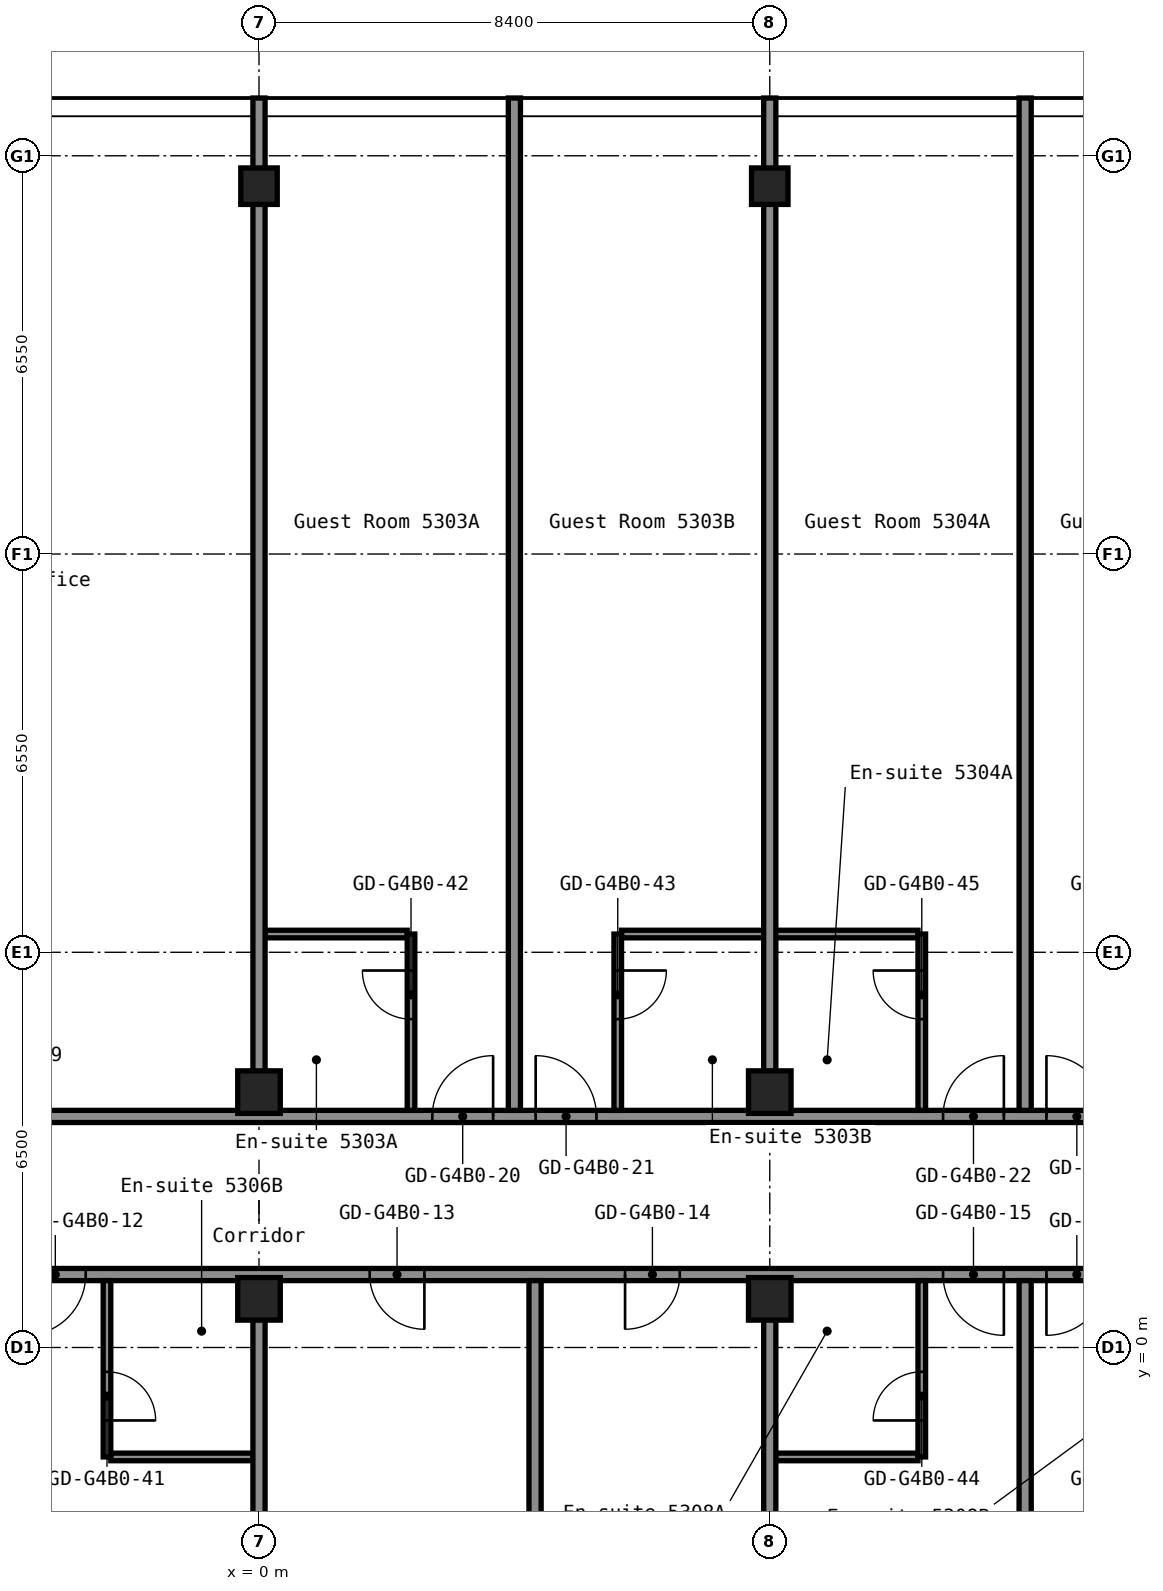
"""IFC4 building model, lengths in metres.
Left out: names, types, materials, properties, quantities, classifications, styles, units other than length and angle.
Written with IfcOpenShell. Run it as: python <this file> out.ifc"""

import sys

from ifc_helpers import new_model, si_unit, direction, frame, frame_2d, origin, origin_2d, place, context, subcontext, project, spatial, rectangle, hollow_rectangle, extrude, element, fill, save


model = new_model("IFC4")
c1 = context("Model", 3, precision=1e-05, world=origin(), true_north=direction((0.0, 1.0)))
c2 = subcontext(c1, "Body", "Model", "MODEL_VIEW")
j1 = project(units=[si_unit("LENGTHUNIT", "METRE"), si_unit("PLANEANGLEUNIT", "RADIAN")], contexts=[c1])
p1 = place(None, origin())
s1 = spatial("IfcSite", under=j1, at=p1, CompositionType="ELEMENT")
p2 = place(p1, origin())
s2 = spatial("IfcBuilding", under=s1, at=p2, CompositionType="ELEMENT")
p3 = place(p2, frame((0.0, 0.0, 189.8)))
s3 = spatial("IfcBuildingStorey", under=s2, at=p3, CompositionType="ELEMENT", Elevation=189.8)
for number, where, z_axis, x_axis in (
    (1, (0.0, 0.8, 0.0), (0.0, 0.0, 1.0), (1.0, 0.0, 0.0)),
    (2, (0.0, 4.2, 0.0), (0.0, 0.0, 1.0), (1.0, 0.0, 0.0)),
):
    element("IfcColumn", number, at=place(p3, frame(where, z_axis=z_axis, x_axis=x_axis)), inside=s3, PredefinedType="COLUMN", context=c2, shape_type="SweptSolid", body=[
        extrude(hollow_rectangle(XDim=0.7, YDim=0.7, WallThickness=0.028, at=origin_2d()), origin(), (0.0, 0.0, 1.0), 2.75),
    ])
p4 = place(p3, frame((0.0, 19.1, 0.0), z_axis=(0.0, 0.0, 1.0), x_axis=(1.0, 0.0, 0.0)))
e3 = element("IfcColumn", 3, at=p4, inside=s3, PredefinedType="COLUMN", context=c2, shape_type="SweptSolid", body=[
    extrude(hollow_rectangle(XDim=0.6, YDim=0.6, WallThickness=0.025, InnerFilletRadius=0.038, OuterFilletRadius=0.062, at=origin_2d()), origin(), (0.0, 0.0, 1.0), 2.75),
])
for number, where, z_axis, x_axis in (
    (4, (8.4, 0.8, 0.0), (0.0, 0.0, 1.0), (1.0, 0.0, 0.0)),
    (5, (8.4, 4.2, 0.0), (0.0, 0.0, 1.0), (1.0, 0.0, 0.0)),
):
    element("IfcColumn", number, at=place(p3, frame(where, z_axis=z_axis, x_axis=x_axis)), inside=s3, PredefinedType="COLUMN", context=c2, shape_type="SweptSolid", body=[
        extrude(hollow_rectangle(XDim=0.7, YDim=0.7, WallThickness=0.028, at=origin_2d()), origin(), (0.0, 0.0, 1.0), 2.75),
    ])
p5 = place(p3, frame((8.4, 19.1, 0.0), z_axis=(0.0, 0.0, 1.0), x_axis=(1.0, 0.0, 0.0)))
e6 = element("IfcColumn", 6, at=p5, inside=s3, PredefinedType="COLUMN", context=c2, shape_type="SweptSolid", body=[
    extrude(hollow_rectangle(XDim=0.6, YDim=0.6, WallThickness=0.025, InnerFilletRadius=0.038, OuterFilletRadius=0.062, at=origin_2d()), origin(), (0.0, 0.0, 1.0), 2.75),
])
for number, where, z_axis, x_axis in (
    (7, (-2.438, -1.8, 0.0), (0.0, 0.0, 1.0), (1.0, 0.0, 0.0)),
    (8, (8.5, -1.8, 0.0), (0.0, 0.0, 1.0), (1.0, 0.0, 0.0)),
):
    element("IfcWall", number, at=place(p3, frame(where, z_axis=z_axis, x_axis=x_axis)), inside=s3, PredefinedType="PARTITIONING", context=c2, shape_type="SweptSolid", body=[
        extrude(rectangle(XDim=2.337, YDim=0.125, at=frame_2d((1.169, 0.0))), origin(), (0.0, 0.0, 1.0), 2.75),
    ])
p6 = place(p3, frame((-16.8, 1.2, 0.0), z_axis=(0.0, 0.0, 1.0), x_axis=(1.0, 0.0, 0.0)))
e9 = element("IfcWall", 9, at=p6, inside=s3, PredefinedType="PARTITIONING", context=c2, shape_type="SweptSolid", body=[
    extrude(rectangle(XDim=33.6, YDim=0.2, at=frame_2d((16.8, 0.0))), origin(), (0.0, 0.0, 1.0), 2.75),
])
p7 = place(p6, frame((2.85, 0.0, 0.0)))
e10 = element("IfcOpeningElement", 10, at=p7, cuts=e9, PredefinedType="OPENING", context=c2, shape_type="SweptSolid", body=[
    extrude(rectangle(XDim=1.0, YDim=2.1, at=frame_2d((0.5, 1.05))), frame((0.0, 0.11, 0.0), z_axis=(0.0, -1.0, 0.0), x_axis=(1.0, 0.0, 0.0)), (0.0, 0.0, 1.0), 0.22),
])
p8 = place(p6, frame((4.55, 0.0, 0.0)))
e11 = element("IfcOpeningElement", 11, at=p8, cuts=e9, PredefinedType="OPENING", context=c2, shape_type="SweptSolid", body=[
    extrude(rectangle(XDim=1.0, YDim=2.1, at=frame_2d((0.5, 1.05))), frame((0.0, 0.11, 0.0), z_axis=(0.0, -1.0, 0.0), x_axis=(1.0, 0.0, 0.0)), (0.0, 0.0, 1.0), 0.22),
])
p9 = place(p6, frame((11.25, 0.0, 0.0)))
e12 = element("IfcOpeningElement", 12, at=p9, cuts=e9, PredefinedType="OPENING", context=c2, shape_type="SweptSolid", body=[
    extrude(rectangle(XDim=1.0, YDim=2.1, at=frame_2d((0.5, 1.05))), frame((0.0, 0.11, 0.0), z_axis=(0.0, -1.0, 0.0), x_axis=(1.0, 0.0, 0.0)), (0.0, 0.0, 1.0), 0.22),
])
p10 = place(p6, frame((12.95, 0.0, 0.0)))
e13 = element("IfcOpeningElement", 13, at=p10, cuts=e9, PredefinedType="OPENING", context=c2, shape_type="SweptSolid", body=[
    extrude(rectangle(XDim=1.0, YDim=2.1, at=frame_2d((0.5, 1.05))), frame((0.0, 0.11, 0.0), z_axis=(0.0, -1.0, 0.0), x_axis=(1.0, 0.0, 0.0)), (0.0, 0.0, 1.0), 0.22),
])
p11 = place(p6, frame((18.62, 0.0, 0.0)))
e14 = element("IfcOpeningElement", 14, at=p11, cuts=e9, PredefinedType="OPENING", context=c2, shape_type="SweptSolid", body=[
    extrude(rectangle(XDim=0.9, YDim=2.1, at=frame_2d((0.45, 1.05))), frame((0.0, 0.11, 0.0), z_axis=(0.0, -1.0, 0.0), x_axis=(1.0, 0.0, 0.0)), (0.0, 0.0, 1.0), 0.22),
])
p12 = place(p6, frame((22.82, 0.0, 0.0)))
e15 = element("IfcOpeningElement", 15, at=p12, cuts=e9, PredefinedType="OPENING", context=c2, shape_type="SweptSolid", body=[
    extrude(rectangle(XDim=0.9, YDim=2.1, at=frame_2d((0.45, 1.05))), frame((0.0, 0.11, 0.0), z_axis=(0.0, -1.0, 0.0), x_axis=(1.0, 0.0, 0.0)), (0.0, 0.0, 1.0), 0.22),
])
p13 = place(p6, frame((28.05, 0.0, 0.0)))
e16 = element("IfcOpeningElement", 16, at=p13, cuts=e9, PredefinedType="OPENING", context=c2, shape_type="SweptSolid", body=[
    extrude(rectangle(XDim=1.0, YDim=2.1, at=frame_2d((0.5, 1.05))), frame((0.0, 0.11, 0.0), z_axis=(0.0, -1.0, 0.0), x_axis=(1.0, 0.0, 0.0)), (0.0, 0.0, 1.0), 0.22),
])
p14 = place(p6, frame((29.75, 0.0, 0.0)))
e17 = element("IfcOpeningElement", 17, at=p14, cuts=e9, PredefinedType="OPENING", context=c2, shape_type="SweptSolid", body=[
    extrude(rectangle(XDim=1.0, YDim=2.1, at=frame_2d((0.5, 1.05))), frame((0.0, 0.11, 0.0), z_axis=(0.0, -1.0, 0.0), x_axis=(1.0, 0.0, 0.0)), (0.0, 0.0, 1.0), 0.22),
])
p15 = place(p3, frame((-16.8, 3.8, 0.0), z_axis=(0.0, 0.0, 1.0), x_axis=(1.0, 0.0, 0.0)))
e18 = element("IfcWall", 18, at=p15, inside=s3, PredefinedType="PARTITIONING", context=c2, shape_type="SweptSolid", body=[
    extrude(rectangle(XDim=33.6, YDim=0.2, at=frame_2d((16.8, 0.0))), origin(), (0.0, 0.0, 1.0), 2.75),
])
p16 = place(p15, frame((2.85, 0.0, 0.0)))
e19 = element("IfcOpeningElement", 19, at=p16, cuts=e18, PredefinedType="OPENING", context=c2, shape_type="SweptSolid", body=[
    extrude(rectangle(XDim=1.0, YDim=2.1, at=frame_2d((0.5, 1.05))), frame((0.0, 0.11, 0.0), z_axis=(0.0, -1.0, 0.0), x_axis=(1.0, 0.0, 0.0)), (0.0, 0.0, 1.0), 0.22),
])
p17 = place(p15, frame((4.55, 0.0, 0.0)))
e20 = element("IfcOpeningElement", 20, at=p17, cuts=e18, PredefinedType="OPENING", context=c2, shape_type="SweptSolid", body=[
    extrude(rectangle(XDim=1.0, YDim=2.1, at=frame_2d((0.5, 1.05))), frame((0.0, 0.11, 0.0), z_axis=(0.0, -1.0, 0.0), x_axis=(1.0, 0.0, 0.0)), (0.0, 0.0, 1.0), 0.22),
])
p18 = place(p15, frame((12.1, 0.0, 0.0)))
e21 = element("IfcOpeningElement", 21, at=p18, cuts=e18, PredefinedType="OPENING", context=c2, shape_type="SweptSolid", body=[
    extrude(rectangle(XDim=1.0, YDim=2.1, at=frame_2d((0.5, 1.05))), frame((0.0, 0.11, 0.0), z_axis=(0.0, -1.0, 0.0), x_axis=(1.0, 0.0, 0.0)), (0.0, 0.0, 1.0), 0.22),
])
p19 = place(p15, frame((19.65, 0.0, 0.0)))
e22 = element("IfcOpeningElement", 22, at=p19, cuts=e18, PredefinedType="OPENING", context=c2, shape_type="SweptSolid", body=[
    extrude(rectangle(XDim=1.0, YDim=2.1, at=frame_2d((0.5, 1.05))), frame((0.0, 0.11, 0.0), z_axis=(0.0, -1.0, 0.0), x_axis=(1.0, 0.0, 0.0)), (0.0, 0.0, 1.0), 0.22),
])
p20 = place(p15, frame((21.35, 0.0, 0.0)))
e23 = element("IfcOpeningElement", 23, at=p20, cuts=e18, PredefinedType="OPENING", context=c2, shape_type="SweptSolid", body=[
    extrude(rectangle(XDim=1.0, YDim=2.1, at=frame_2d((0.5, 1.05))), frame((0.0, 0.11, 0.0), z_axis=(0.0, -1.0, 0.0), x_axis=(1.0, 0.0, 0.0)), (0.0, 0.0, 1.0), 0.22),
])
p21 = place(p15, frame((28.05, 0.0, 0.0)))
e24 = element("IfcOpeningElement", 24, at=p21, cuts=e18, PredefinedType="OPENING", context=c2, shape_type="SweptSolid", body=[
    extrude(rectangle(XDim=1.0, YDim=2.1, at=frame_2d((0.5, 1.05))), frame((0.0, 0.11, 0.0), z_axis=(0.0, -1.0, 0.0), x_axis=(1.0, 0.0, 0.0)), (0.0, 0.0, 1.0), 0.22),
])
p22 = place(p15, frame((29.75, 0.0, 0.0)))
e25 = element("IfcOpeningElement", 25, at=p22, cuts=e18, PredefinedType="OPENING", context=c2, shape_type="SweptSolid", body=[
    extrude(rectangle(XDim=1.0, YDim=2.1, at=frame_2d((0.5, 1.05))), frame((0.0, 0.11, 0.0), z_axis=(0.0, -1.0, 0.0), x_axis=(1.0, 0.0, 0.0)), (0.0, 0.0, 1.0), 0.22),
])
p23 = place(p3, frame((0.1, 6.8, 0.0), z_axis=(0.0, 0.0, 1.0), x_axis=(1.0, 0.0, 0.0)))
e26 = element("IfcWall", 26, at=p23, inside=s3, PredefinedType="PARTITIONING", context=c2, shape_type="SweptSolid", body=[
    extrude(rectangle(XDim=2.337, YDim=0.125, at=frame_2d((1.169, 0.0))), origin(), (0.0, 0.0, 1.0), 2.75),
])
p24 = place(p3, frame((5.962, 6.8, 0.0), z_axis=(0.0, 0.0, 1.0), x_axis=(1.0, 0.0, 0.0)))
e27 = element("IfcWall", 27, at=p24, inside=s3, PredefinedType="PARTITIONING", context=c2, shape_type="SweptSolid", body=[
    extrude(rectangle(XDim=4.875, YDim=0.125, at=frame_2d((2.438, 0.0))), origin(), (0.0, 0.0, 1.0), 2.75),
])
p25 = place(p3, frame((-2.5, -1.8, 0.0), z_axis=(0.0, 0.0, 1.0), x_axis=(0.0, 1.0, 0.0)))
e28 = element("IfcWall", 28, at=p25, inside=s3, PredefinedType="PARTITIONING", context=c2, shape_type="SweptSolid", body=[
    extrude(rectangle(XDim=2.9, YDim=0.125, at=frame_2d((1.45, 0.0))), origin(), (0.0, 0.0, 1.0), 2.75),
])
p26 = place(p25, frame((0.6, 0.0, 0.0)))
e29 = element("IfcOpeningElement", 29, at=p26, cuts=e28, PredefinedType="OPENING", context=c2, shape_type="SweptSolid", body=[
    extrude(rectangle(XDim=0.8, YDim=2.1, at=frame_2d((0.4, 1.05))), frame((0.0, 0.073, 0.0), z_axis=(0.0, -1.0, 0.0), x_axis=(1.0, 0.0, 0.0)), (0.0, 0.0, 1.0), 0.145),
])
for number, where, z_axis, x_axis in (
    (30, (0.0, -15.55, 0.0), (0.0, 0.0, 1.0), (0.0, 1.0, 0.0)),
    (31, (0.0, 4.54, 0.0), (0.0, 0.0, 1.0), (0.0, 1.0, 0.0)),
):
    element("IfcWall", number, at=place(p3, frame(where, z_axis=z_axis, x_axis=x_axis)), inside=s3, PredefinedType="PARTITIONING", context=c2, shape_type="SweptSolid", body=[
        extrude(rectangle(XDim=16.01, YDim=0.2, at=frame_2d((8.005, 0.0))), origin(), (0.0, 0.0, 1.0), 2.75),
    ])
p27 = place(p3, frame((2.5, 3.9, 0.0), z_axis=(0.0, 0.0, 1.0), x_axis=(0.0, 1.0, 0.0)))
e32 = element("IfcWall", 32, at=p27, inside=s3, PredefinedType="PARTITIONING", context=c2, shape_type="SweptSolid", body=[
    extrude(rectangle(XDim=2.9, YDim=0.125, at=frame_2d((1.45, 0.0))), origin(), (0.0, 0.0, 1.0), 2.75),
])
p28 = place(p27, frame((1.5, 0.0, 0.0)))
e33 = element("IfcOpeningElement", 33, at=p28, cuts=e32, PredefinedType="OPENING", context=c2, shape_type="SweptSolid", body=[
    extrude(rectangle(XDim=0.8, YDim=2.1, at=frame_2d((0.4, 1.05))), frame((0.0, 0.073, 0.0), z_axis=(0.0, -1.0, 0.0), x_axis=(1.0, 0.0, 0.0)), (0.0, 0.0, 1.0), 0.145),
])
for number, where, z_axis, x_axis in (
    (34, (4.2, 3.9, 0.0), (0.0, 0.0, 1.0), (0.0, 1.0, 0.0)),
    (35, (4.54, -15.55, 0.0), (0.0, 0.0, 1.0), (0.0, 1.0, 0.0)),
):
    element("IfcWall", number, at=place(p3, frame(where, z_axis=z_axis, x_axis=x_axis)), inside=s3, PredefinedType="PARTITIONING", context=c2, shape_type="SweptSolid", body=[
        extrude(rectangle(XDim=16.65, YDim=0.2, at=frame_2d((8.325, 0.0))), origin(), (0.0, 0.0, 1.0), 2.75),
    ])
p29 = place(p3, frame((5.9, 3.9, 0.0), z_axis=(0.0, 0.0, 1.0), x_axis=(0.0, 1.0, 0.0)))
e36 = element("IfcWall", 36, at=p29, inside=s3, PredefinedType="PARTITIONING", context=c2, shape_type="SweptSolid", body=[
    extrude(rectangle(XDim=2.9, YDim=0.125, at=frame_2d((1.45, 0.0))), origin(), (0.0, 0.0, 1.0), 2.75),
])
p30 = place(p29, frame((1.5, 0.0, 0.0)))
e37 = element("IfcOpeningElement", 37, at=p30, cuts=e36, PredefinedType="OPENING", context=c2, shape_type="SweptSolid", body=[
    extrude(rectangle(XDim=0.8, YDim=2.1, at=frame_2d((0.4, 1.05))), frame((0.0, 0.073, 0.0), z_axis=(0.0, -1.0, 0.0), x_axis=(1.0, 0.0, 0.0)), (0.0, 0.0, 1.0), 0.145),
])
for number, where, z_axis, x_axis in (
    (38, (8.4, -15.55, 0.0), (0.0, 0.0, 1.0), (0.0, 1.0, 0.0)),
    (39, (8.4, 4.54, 0.0), (0.0, 0.0, 1.0), (0.0, 1.0, 0.0)),
):
    element("IfcWall", number, at=place(p3, frame(where, z_axis=z_axis, x_axis=x_axis)), inside=s3, PredefinedType="PARTITIONING", context=c2, shape_type="SweptSolid", body=[
        extrude(rectangle(XDim=16.01, YDim=0.2, at=frame_2d((8.005, 0.0))), origin(), (0.0, 0.0, 1.0), 2.75),
    ])
p31 = place(p3, frame((10.9, -1.8, 0.0), z_axis=(0.0, 0.0, 1.0), x_axis=(0.0, 1.0, 0.0)))
e40 = element("IfcWall", 40, at=p31, inside=s3, PredefinedType="PARTITIONING", context=c2, shape_type="SweptSolid", body=[
    extrude(rectangle(XDim=2.9, YDim=0.125, at=frame_2d((1.45, 0.0))), origin(), (0.0, 0.0, 1.0), 2.75),
])
p32 = place(p31, frame((0.6, 0.0, 0.0)))
e41 = element("IfcOpeningElement", 41, at=p32, cuts=e40, PredefinedType="OPENING", context=c2, shape_type="SweptSolid", body=[
    extrude(rectangle(XDim=0.8, YDim=2.1, at=frame_2d((0.4, 1.05))), frame((0.0, 0.073, 0.0), z_axis=(0.0, -1.0, 0.0), x_axis=(1.0, 0.0, 0.0)), (0.0, 0.0, 1.0), 0.145),
])
p33 = place(p3, frame((10.9, 3.9, 0.0), z_axis=(0.0, 0.0, 1.0), x_axis=(0.0, 1.0, 0.0)))
e42 = element("IfcWall", 42, at=p33, inside=s3, PredefinedType="PARTITIONING", context=c2, shape_type="SweptSolid", body=[
    extrude(rectangle(XDim=2.9, YDim=0.125, at=frame_2d((1.45, 0.0))), origin(), (0.0, 0.0, 1.0), 2.75),
])
p34 = place(p33, frame((1.5, 0.0, 0.0)))
e43 = element("IfcOpeningElement", 43, at=p34, cuts=e42, PredefinedType="OPENING", context=c2, shape_type="SweptSolid", body=[
    extrude(rectangle(XDim=0.8, YDim=2.1, at=frame_2d((0.4, 1.05))), frame((0.0, 0.073, 0.0), z_axis=(0.0, -1.0, 0.0), x_axis=(1.0, 0.0, 0.0)), (0.0, 0.0, 1.0), 0.145),
])
for number, where, z_axis, x_axis in (
    (44, (12.6, -15.55, 0.0), (0.0, 0.0, 1.0), (0.0, 1.0, 0.0)),
    (45, (12.6, 3.9, 0.0), (0.0, 0.0, 1.0), (0.0, 1.0, 0.0)),
):
    element("IfcWall", number, at=place(p3, frame(where, z_axis=z_axis, x_axis=x_axis)), inside=s3, PredefinedType="PARTITIONING", context=c2, shape_type="SweptSolid", body=[
        extrude(rectangle(XDim=16.65, YDim=0.2, at=frame_2d((8.325, 0.0))), origin(), (0.0, 0.0, 1.0), 2.75),
    ])
p35 = place(p10, origin())
e46 = element("IfcDoor", 46, at=p35, inside=s3, OperationType="SINGLE_SWING_LEFT", PredefinedType="DOOR", context=c2, shape_type="SweptSolid", body=[
    extrude(rectangle(XDim=1.0, YDim=2.1, at=frame_2d((0.5, 1.05))), frame((0.0, 0.025, 0.0), z_axis=(0.0, -1.0, 0.0), x_axis=(1.0, 0.0, 0.0)), (0.0, 0.0, 1.0), 0.05),
])
fill(e13, e46)
p36 = place(p11, origin())
e47 = element("IfcDoor", 47, at=p36, inside=s3, OperationType="SINGLE_SWING_RIGHT", PredefinedType="DOOR", context=c2, shape_type="SweptSolid", body=[
    extrude(rectangle(XDim=0.9, YDim=2.1, at=frame_2d((0.45, 1.05))), frame((0.0, 0.025, 0.0), z_axis=(0.0, -1.0, 0.0), x_axis=(1.0, 0.0, 0.0)), (0.0, 0.0, 1.0), 0.05),
])
fill(e14, e47)
p37 = place(p12, origin())
e48 = element("IfcDoor", 48, at=p37, inside=s3, OperationType="SINGLE_SWING_LEFT", PredefinedType="DOOR", context=c2, shape_type="SweptSolid", body=[
    extrude(rectangle(XDim=0.9, YDim=2.1, at=frame_2d((0.45, 1.05))), frame((0.0, 0.025, 0.0), z_axis=(0.0, -1.0, 0.0), x_axis=(1.0, 0.0, 0.0)), (0.0, 0.0, 1.0), 0.05),
])
fill(e15, e48)
p38 = place(p13, origin())
e49 = element("IfcDoor", 49, at=p38, inside=s3, OperationType="SINGLE_SWING_RIGHT", PredefinedType="DOOR", context=c2, shape_type="SweptSolid", body=[
    extrude(rectangle(XDim=1.0, YDim=2.1, at=frame_2d((0.5, 1.05))), frame((0.0, 0.025, 0.0), z_axis=(0.0, -1.0, 0.0), x_axis=(1.0, 0.0, 0.0)), (0.0, 0.0, 1.0), 0.05),
])
fill(e16, e49)
p39 = place(p14, origin())
e50 = element("IfcDoor", 50, at=p39, inside=s3, OperationType="SINGLE_SWING_LEFT", PredefinedType="DOOR", context=c2, shape_type="SweptSolid", body=[
    extrude(rectangle(XDim=1.0, YDim=2.1, at=frame_2d((0.5, 1.05))), frame((0.0, 0.025, 0.0), z_axis=(0.0, -1.0, 0.0), x_axis=(1.0, 0.0, 0.0)), (0.0, 0.0, 1.0), 0.05),
])
fill(e17, e50)
p40 = place(p19, origin())
e51 = element("IfcDoor", 51, at=p40, inside=s3, OperationType="SINGLE_SWING_LEFT", PredefinedType="DOOR", context=c2, shape_type="SweptSolid", body=[
    extrude(rectangle(XDim=1.0, YDim=2.1, at=frame_2d((0.5, 1.05))), frame((0.0, 0.025, 0.0), z_axis=(0.0, -1.0, 0.0), x_axis=(1.0, 0.0, 0.0)), (0.0, 0.0, 1.0), 0.05),
])
fill(e22, e51)
p41 = place(p20, origin())
e52 = element("IfcDoor", 52, at=p41, inside=s3, OperationType="SINGLE_SWING_RIGHT", PredefinedType="DOOR", context=c2, shape_type="SweptSolid", body=[
    extrude(rectangle(XDim=1.0, YDim=2.1, at=frame_2d((0.5, 1.05))), frame((0.0, 0.025, 0.0), z_axis=(0.0, -1.0, 0.0), x_axis=(1.0, 0.0, 0.0)), (0.0, 0.0, 1.0), 0.05),
])
fill(e23, e52)
p42 = place(p21, origin())
e53 = element("IfcDoor", 53, at=p42, inside=s3, OperationType="SINGLE_SWING_LEFT", PredefinedType="DOOR", context=c2, shape_type="SweptSolid", body=[
    extrude(rectangle(XDim=1.0, YDim=2.1, at=frame_2d((0.5, 1.05))), frame((0.0, 0.025, 0.0), z_axis=(0.0, -1.0, 0.0), x_axis=(1.0, 0.0, 0.0)), (0.0, 0.0, 1.0), 0.05),
])
fill(e24, e53)
p43 = place(p22, origin())
e54 = element("IfcDoor", 54, at=p43, inside=s3, OperationType="SINGLE_SWING_RIGHT", PredefinedType="DOOR", context=c2, shape_type="SweptSolid", body=[
    extrude(rectangle(XDim=1.0, YDim=2.1, at=frame_2d((0.5, 1.05))), frame((0.0, 0.025, 0.0), z_axis=(0.0, -1.0, 0.0), x_axis=(1.0, 0.0, 0.0)), (0.0, 0.0, 1.0), 0.05),
])
fill(e25, e54)
p44 = place(p26, origin())
e55 = element("IfcDoor", 55, at=p44, inside=s3, OperationType="SINGLE_SWING_LEFT", PredefinedType="DOOR", context=c2, shape_type="SweptSolid", body=[
    extrude(rectangle(XDim=0.8, YDim=2.1, at=frame_2d((0.4, 1.05))), frame((0.0, 0.025, 0.0), z_axis=(0.0, -1.0, 0.0), x_axis=(1.0, 0.0, 0.0)), (0.0, 0.0, 1.0), 0.05),
])
fill(e29, e55)
p45 = place(p28, origin())
e56 = element("IfcDoor", 56, at=p45, inside=s3, OperationType="SINGLE_SWING_LEFT", PredefinedType="DOOR", context=c2, shape_type="SweptSolid", body=[
    extrude(rectangle(XDim=0.8, YDim=2.1, at=frame_2d((0.4, 1.05))), frame((0.0, 0.025, 0.0), z_axis=(0.0, -1.0, 0.0), x_axis=(1.0, 0.0, 0.0)), (0.0, 0.0, 1.0), 0.05),
])
fill(e33, e56)
p46 = place(p30, origin())
e57 = element("IfcDoor", 57, at=p46, inside=s3, OperationType="SINGLE_SWING_RIGHT", PredefinedType="DOOR", context=c2, shape_type="SweptSolid", body=[
    extrude(rectangle(XDim=0.8, YDim=2.1, at=frame_2d((0.4, 1.05))), frame((0.0, 0.025, 0.0), z_axis=(0.0, -1.0, 0.0), x_axis=(1.0, 0.0, 0.0)), (0.0, 0.0, 1.0), 0.05),
])
fill(e37, e57)
p47 = place(p32, origin())
e58 = element("IfcDoor", 58, at=p47, inside=s3, OperationType="SINGLE_SWING_RIGHT", PredefinedType="DOOR", context=c2, shape_type="SweptSolid", body=[
    extrude(rectangle(XDim=0.8, YDim=2.1, at=frame_2d((0.4, 1.05))), frame((0.0, 0.025, 0.0), z_axis=(0.0, -1.0, 0.0), x_axis=(1.0, 0.0, 0.0)), (0.0, 0.0, 1.0), 0.05),
])
fill(e41, e58)
p48 = place(p34, origin())
e59 = element("IfcDoor", 59, at=p48, inside=s3, OperationType="SINGLE_SWING_LEFT", PredefinedType="DOOR", context=c2, shape_type="SweptSolid", body=[
    extrude(rectangle(XDim=0.8, YDim=2.1, at=frame_2d((0.4, 1.05))), frame((0.0, 0.025, 0.0), z_axis=(0.0, -1.0, 0.0), x_axis=(1.0, 0.0, 0.0)), (0.0, 0.0, 1.0), 0.05),
])
fill(e43, e59)
save(model, sys.argv[1])
